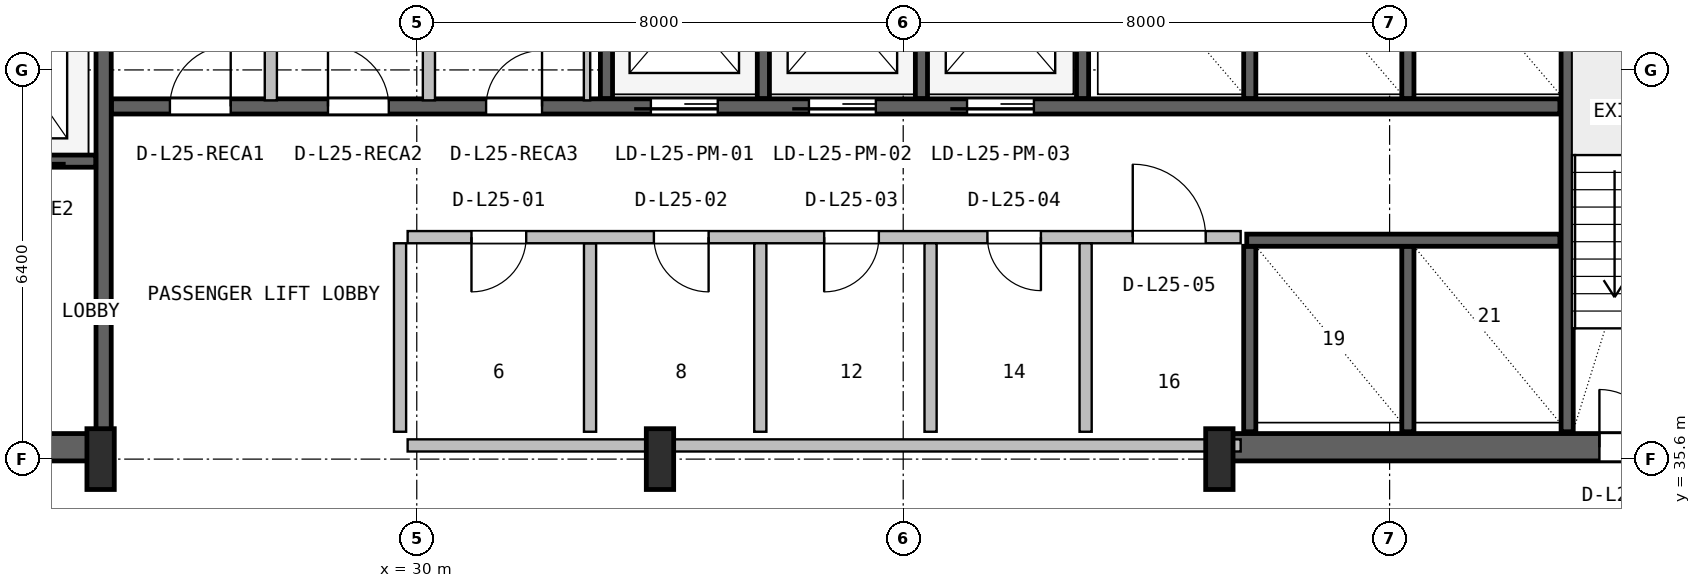
"""IFC4 building model, lengths in metres.
Left out: names, types, materials, properties, quantities, classifications, styles, units other than length and angle.
Written with IfcOpenShell. Run it as: python <this file> out.ifc"""

import sys

from ifc_helpers import new_model, si_unit, direction, frame, frame_2d, origin, origin_2d, place, context, subcontext, project, spatial, rectangle, i_section, extrude, source, transform, mapped, element, fill, save


model = new_model("IFC4")
c1 = context("Model", 3, precision=1e-05, world=origin(), true_north=direction((0.0, 1.0)))
c2 = subcontext(c1, "Body", "Model", "MODEL_VIEW")
j1 = project(units=[si_unit("LENGTHUNIT", "METRE"), si_unit("PLANEANGLEUNIT", "RADIAN")], contexts=[c1])
p1 = place(None, origin())
s1 = spatial("IfcSite", under=j1, at=p1, CompositionType="ELEMENT")
p2 = place(p1, origin())
s2 = spatial("IfcBuilding", under=s1, at=p2, CompositionType="ELEMENT")
p3 = place(p2, frame((0.0, 0.0, 106.8)))
s3 = spatial("IfcBuildingStorey", under=s2, at=p3, CompositionType="ELEMENT", Elevation=106.8)
p4 = place(p3, frame((15.57, 35.795, 0.0), z_axis=(0.0, 0.0, 1.0), x_axis=(1.0, 0.0, 0.0)))
e1 = element("IfcWall", 1, at=p4, inside=s3, PredefinedType="SHEAR", context=c2, shape_type="SweptSolid", body=[
    extrude(rectangle(XDim=9.23, YDim=0.45, at=frame_2d((4.615, 0.0))), origin(), (0.0, 0.0, 1.0), 3.55),
])
p5 = place(p4, frame((5.4, 0.0, 0.0)))
e2 = element("IfcOpeningElement", 2, at=p5, cuts=e1, PredefinedType="OPENING", context=c2, shape_type="SweptSolid", body=[
    extrude(rectangle(XDim=1.0, YDim=2.1, at=frame_2d((0.5, 1.05))), frame((0.0, 0.235, 0.0), z_axis=(0.0, -1.0, 0.0), x_axis=(1.0, 0.0, 0.0)), (0.0, 0.0, 1.0), 0.47),
])
p6 = place(p3, frame((43.2, 35.795, 0.0), z_axis=(0.0, 0.0, 1.0), x_axis=(1.0, 0.0, 0.0)))
e3 = element("IfcWall", 3, at=p6, inside=s3, PredefinedType="SHEAR", context=c2, shape_type="SweptSolid", body=[
    extrude(rectangle(XDim=9.23, YDim=0.45, at=frame_2d((4.615, 0.0))), origin(), (0.0, 0.0, 1.0), 3.55),
])
p7 = place(p6, frame((6.25, 0.0, 0.0)))
e4 = element("IfcOpeningElement", 4, at=p7, cuts=e3, PredefinedType="OPENING", context=c2, shape_type="SweptSolid", body=[
    extrude(rectangle(XDim=0.95, YDim=2.1, at=frame_2d((0.475, 1.05))), frame((0.0, 0.235, 0.0), z_axis=(0.0, -1.0, 0.0), x_axis=(1.0, 0.0, 0.0)), (0.0, 0.0, 1.0), 0.47),
])
m1 = source(origin(), c2, "Body", "SweptSolid", [
    extrude(i_section(OverallWidth=0.45, OverallDepth=1.0, WebThickness=0.016, FlangeThickness=0.03, FilletRadius=0.016, at=origin_2d()), origin(), (0.0, 0.0, 1.0), 3.8),
])
for number, where, z_axis, x_axis in (
    (5, (24.8, 35.6, 0.0), (0.0, 0.0, 1.0), (1.0, 0.0, 0.0)),
    (6, (34.0, 35.6, 0.0), (0.0, 0.0, 1.0), (1.0, 0.0, 0.0)),
    (7, (43.2, 35.6, 0.0), (0.0, 0.0, 1.0), (1.0, 0.0, 0.0)),
):
    element("IfcColumn", number, at=place(p3, frame(where, z_axis=z_axis, x_axis=x_axis)), inside=s3, PredefinedType="COLUMN", context=c2, shape_type="MappedRepresentation", body=[
        mapped(m1, transform((0.0, 0.0, 0.0), x_axis=(1.0, 0.0, 0.0), y_axis=(0.0, 1.0, 0.0), z_axis=(0.0, 0.0, 1.0), scale=1.0)),
    ])
p8 = place(p3, frame((24.85, 36.05, 0.0), z_axis=(0.0, 0.0, 1.0), x_axis=(0.0, 1.0, 0.0)))
e8 = element("IfcWall", 8, at=p8, inside=s3, PredefinedType="SHEAR", context=c2, shape_type="SweptSolid", body=[
    extrude(rectangle(XDim=10.45, YDim=0.25, at=frame_2d((5.225, 0.0))), origin(), (0.0, 0.0, 1.0), 3.55),
])
p9 = place(p3, frame((19.2, 40.5, 0.0), z_axis=(0.0, 0.0, 1.0), x_axis=(1.0, 0.0, 0.0)))
e9 = element("IfcWall", 9, at=p9, inside=s3, PredefinedType="SHEAR", context=c2, shape_type="SweptSolid", body=[
    extrude(rectangle(XDim=5.52, YDim=0.2, at=frame_2d((2.76, 0.0))), origin(), (0.0, 0.0, 1.0), 3.55),
])
p10 = place(p9, frame((1.05, 0.0, 0.0)))
e10 = element("IfcOpeningElement", 10, at=p10, cuts=e9, PredefinedType="OPENING", context=c2, shape_type="SweptSolid", body=[
    extrude(rectangle(XDim=1.1, YDim=2.18, at=frame_2d((0.55, 1.09))), frame((0.0, 0.11, 0.0), z_axis=(0.0, -1.0, 0.0), x_axis=(1.0, 0.0, 0.0)), (0.0, 0.0, 1.0), 0.22),
])
p11 = place(p9, frame((3.65, 0.0, 0.0)))
e11 = element("IfcOpeningElement", 11, at=p11, cuts=e9, PredefinedType="OPENING", context=c2, shape_type="SweptSolid", body=[
    extrude(rectangle(XDim=1.1, YDim=2.18, at=frame_2d((0.55, 1.09))), frame((0.0, 0.11, 0.0), z_axis=(0.0, -1.0, 0.0), x_axis=(1.0, 0.0, 0.0)), (0.0, 0.0, 1.0), 0.22),
])
p12 = place(p3, frame((48.92, 36.05, 0.0), z_axis=(0.0, 0.0, 1.0), x_axis=(0.0, 1.0, 0.0)))
e12 = element("IfcWall", 12, at=p12, inside=s3, PredefinedType="SHEAR", context=c2, shape_type="SweptSolid", body=[
    extrude(rectangle(XDim=10.5, YDim=0.2, at=frame_2d((5.25, 0.0))), origin(), (0.0, 0.0, 1.0), 3.55),
])
p13 = place(p3, frame((24.98, 41.4, 0.0), z_axis=(0.0, 0.0, 1.0), x_axis=(1.0, 0.0, 0.0)))
e13 = element("IfcWall", 13, at=p13, inside=s3, PredefinedType="SHEAR", context=c2, shape_type="SweptSolid", body=[
    extrude(rectangle(XDim=23.82, YDim=0.25, at=frame_2d((11.91, 0.0))), origin(), (0.0, 0.0, 1.0), 3.55),
])
p14 = place(p13, frame((8.87, 0.0, 0.0)))
e14 = element("IfcOpeningElement", 14, at=p14, cuts=e13, PredefinedType="OPENING", context=c2, shape_type="SweptSolid", body=[
    extrude(rectangle(XDim=1.1, YDim=2.18, at=frame_2d((0.55, 1.09))), frame((0.0, 0.135, 0.0), z_axis=(0.0, -1.0, 0.0), x_axis=(1.0, 0.0, 0.0)), (0.0, 0.0, 1.0), 0.27),
])
p15 = place(p13, frame((11.47, 0.0, 0.0)))
e15 = element("IfcOpeningElement", 15, at=p15, cuts=e13, PredefinedType="OPENING", context=c2, shape_type="SweptSolid", body=[
    extrude(rectangle(XDim=1.1, YDim=2.18, at=frame_2d((0.55, 1.09))), frame((0.0, 0.135, 0.0), z_axis=(0.0, -1.0, 0.0), x_axis=(1.0, 0.0, 0.0)), (0.0, 0.0, 1.0), 0.27),
])
p16 = place(p13, frame((14.07, 0.0, 0.0)))
e16 = element("IfcOpeningElement", 16, at=p16, cuts=e13, PredefinedType="OPENING", context=c2, shape_type="SweptSolid", body=[
    extrude(rectangle(XDim=1.1, YDim=2.18, at=frame_2d((0.55, 1.09))), frame((0.0, 0.135, 0.0), z_axis=(0.0, -1.0, 0.0), x_axis=(1.0, 0.0, 0.0)), (0.0, 0.0, 1.0), 0.27),
])
p17 = place(p13, frame((0.96, 0.0, 0.0)))
e17 = element("IfcOpeningElement", 17, at=p17, cuts=e13, PredefinedType="OPENING", context=c2, shape_type="SweptSolid", body=[
    extrude(rectangle(XDim=1.0, YDim=2.08, at=frame_2d((0.5, 1.04))), frame((0.0, 0.135, 0.0), z_axis=(0.0, -1.0, 0.0), x_axis=(1.0, 0.0, 0.0)), (0.0, 0.0, 1.0), 0.27),
])
p18 = place(p13, frame((3.56, 0.0, 0.0)))
e18 = element("IfcOpeningElement", 18, at=p18, cuts=e13, PredefinedType="OPENING", context=c2, shape_type="SweptSolid", body=[
    extrude(rectangle(XDim=1.0, YDim=2.08, at=frame_2d((0.5, 1.04))), frame((0.0, 0.135, 0.0), z_axis=(0.0, -1.0, 0.0), x_axis=(1.0, 0.0, 0.0)), (0.0, 0.0, 1.0), 0.27),
])
p19 = place(p13, frame((6.16, 0.0, 0.0)))
e19 = element("IfcOpeningElement", 19, at=p19, cuts=e13, PredefinedType="OPENING", context=c2, shape_type="SweptSolid", body=[
    extrude(rectangle(XDim=0.92, YDim=2.08, at=frame_2d((0.46, 1.04))), frame((0.0, 0.135, 0.0), z_axis=(0.0, -1.0, 0.0), x_axis=(1.0, 0.0, 0.0)), (0.0, 0.0, 1.0), 0.27),
])
p20 = place(p3, frame((33.12, 41.53, 0.0), z_axis=(0.0, 0.0, 1.0), x_axis=(0.0, 1.0, 0.0)))
e20 = element("IfcWall", 20, at=p20, inside=s3, PredefinedType="SHEAR", context=c2, shape_type="SweptSolid", body=[
    extrude(rectangle(XDim=5.02, YDim=0.2, at=frame_2d((2.51, 0.0))), origin(), (0.0, 0.0, 1.0), 3.55),
])
for number, where, z_axis, x_axis in (
    (21, (35.7, 41.53, 0.0), (0.0, 0.0, 1.0), (0.0, 1.0, 0.0)),
    (22, (38.3, 41.53, 0.0), (0.0, 0.0, 1.0), (0.0, 1.0, 0.0)),
):
    element("IfcWall", number, at=place(p3, frame(where, z_axis=z_axis, x_axis=x_axis)), inside=s3, PredefinedType="SHEAR", context=c2, shape_type="SweptSolid", body=[
        extrude(rectangle(XDim=2.87, YDim=0.2, at=frame_2d((1.435, 0.0))), origin(), (0.0, 0.0, 1.0), 3.55),
    ])
p21 = place(p3, frame((40.95, 41.53, 0.0), z_axis=(0.0, 0.0, 1.0), x_axis=(0.0, 1.0, 0.0)))
e23 = element("IfcWall", 23, at=p21, inside=s3, PredefinedType="SHEAR", context=c2, shape_type="SweptSolid", body=[
    extrude(rectangle(XDim=5.02, YDim=0.2, at=frame_2d((2.51, 0.0))), origin(), (0.0, 0.0, 1.0), 3.55),
])
for number, where, z_axis, x_axis in (
    (24, (43.7, 41.53, 0.0), (0.0, 0.0, 1.0), (0.0, 1.0, 0.0)),
    (25, (46.3, 41.53, 0.0), (0.0, 0.0, 1.0), (0.0, 1.0, 0.0)),
):
    element("IfcWall", number, at=place(p3, frame(where, z_axis=z_axis, x_axis=x_axis)), inside=s3, PredefinedType="SHEAR", context=c2, shape_type="SweptSolid", body=[
        extrude(rectangle(XDim=2.87, YDim=0.2, at=frame_2d((1.435, 0.0))), origin(), (0.0, 0.0, 1.0), 3.55),
    ])
for number, where, z_axis, x_axis in (
    (26, (43.7, 36.05, 0.0), (0.0, 0.0, 1.0), (0.0, 1.0, 0.0)),
    (27, (46.3, 36.05, 0.0), (0.0, 0.0, 1.0), (0.0, 1.0, 0.0)),
):
    element("IfcWall", number, at=place(p3, frame(where, z_axis=z_axis, x_axis=x_axis)), inside=s3, PredefinedType="SHEAR", context=c2, shape_type="SweptSolid", body=[
        extrude(rectangle(XDim=3.05, YDim=0.2, at=frame_2d((1.525, 0.0))), origin(), (0.0, 0.0, 1.0), 3.55),
    ])
p22 = place(p3, frame((43.65, 39.2, 0.0), z_axis=(0.0, 0.0, 1.0), x_axis=(1.0, 0.0, 0.0)))
e28 = element("IfcWall", 28, at=p22, inside=s3, PredefinedType="SHEAR", context=c2, shape_type="SweptSolid", body=[
    extrude(rectangle(XDim=5.15, YDim=0.2, at=frame_2d((2.575, 0.0))), origin(), (0.0, 0.0, 1.0), 3.55),
])
p23 = place(p3, frame((29.85, 35.825, 0.0), z_axis=(0.0, 0.0, 1.0), x_axis=(1.0, 0.0, 0.0)))
e29 = element("IfcWall", 29, at=p23, inside=s3, PredefinedType="SOLIDWALL", context=c2, shape_type="SweptSolid", body=[
    extrude(rectangle(XDim=13.7, YDim=0.2, at=frame_2d((6.85, 0.0))), origin(), (0.0, 0.0, 1.0), 2.325),
])
p24 = place(p3, frame((32.85, 36.05, 0.0), z_axis=(0.0, 0.0, 1.0), x_axis=(0.0, 1.0, 0.0)))
e30 = element("IfcWall", 30, at=p24, inside=s3, PredefinedType="PLUMBINGWALL", context=c2, shape_type="SweptSolid", body=[
    extrude(rectangle(XDim=3.1, YDim=0.2, at=frame_2d((1.55, 0.0))), origin(), (0.0, 0.0, 1.0), 3.53),
])
p25 = place(p3, frame((29.85, 39.25, 0.0), z_axis=(0.0, 0.0, 1.0), x_axis=(1.0, 0.0, 0.0)))
e31 = element("IfcWall", 31, at=p25, inside=s3, PredefinedType="SOLIDWALL", context=c2, shape_type="SweptSolid", body=[
    extrude(rectangle(XDim=13.7, YDim=0.2, at=frame_2d((6.85, 0.0))), origin(), (0.0, 0.0, 1.0), 3.53),
])
p26 = place(p25, frame((1.05, 0.0, 0.0)))
e32 = element("IfcOpeningElement", 32, at=p26, cuts=e31, PredefinedType="OPENING", context=c2, shape_type="SweptSolid", body=[
    extrude(rectangle(XDim=0.9, YDim=2.06, at=frame_2d((0.45, 1.03))), frame((0.0, 0.11, 0.0), z_axis=(0.0, -1.0, 0.0), x_axis=(1.0, 0.0, 0.0)), (0.0, 0.0, 1.0), 0.22),
])
p27 = place(p25, frame((4.05, 0.0, 0.0)))
e33 = element("IfcOpeningElement", 33, at=p27, cuts=e31, PredefinedType="OPENING", context=c2, shape_type="SweptSolid", body=[
    extrude(rectangle(XDim=0.9, YDim=2.06, at=frame_2d((0.45, 1.03))), frame((0.0, 0.11, 0.0), z_axis=(0.0, -1.0, 0.0), x_axis=(1.0, 0.0, 0.0)), (0.0, 0.0, 1.0), 0.22),
])
p28 = place(p25, frame((6.85, 0.0, 0.0)))
e34 = element("IfcOpeningElement", 34, at=p28, cuts=e31, PredefinedType="OPENING", context=c2, shape_type="SweptSolid", body=[
    extrude(rectangle(XDim=0.9, YDim=2.06, at=frame_2d((0.45, 1.03))), frame((0.0, 0.11, 0.0), z_axis=(0.0, -1.0, 0.0), x_axis=(1.0, 0.0, 0.0)), (0.0, 0.0, 1.0), 0.22),
])
p29 = place(p25, frame((9.535, 0.0, 0.0)))
e35 = element("IfcOpeningElement", 35, at=p29, cuts=e31, PredefinedType="OPENING", context=c2, shape_type="SweptSolid", body=[
    extrude(rectangle(XDim=0.88, YDim=2.06, at=frame_2d((0.44, 1.03))), frame((0.0, 0.11, 0.0), z_axis=(0.0, -1.0, 0.0), x_axis=(1.0, 0.0, 0.0)), (0.0, 0.0, 1.0), 0.22),
])
p30 = place(p25, frame((11.925, 0.0, 0.0)))
e36 = element("IfcOpeningElement", 36, at=p30, cuts=e31, PredefinedType="OPENING", context=c2, shape_type="SweptSolid", body=[
    extrude(rectangle(XDim=1.2, YDim=2.1, at=frame_2d((0.6, 1.05))), frame((0.0, 0.11, 0.0), z_axis=(0.0, -1.0, 0.0), x_axis=(1.0, 0.0, 0.0)), (0.0, 0.0, 1.0), 0.22),
])
for number, where, z_axis, x_axis in (
    (37, (29.725, 36.05, 0.0), (0.0, 0.0, 1.0), (0.0, 1.0, 0.0)),
    (38, (35.65, 36.05, 0.0), (0.0, 0.0, 1.0), (0.0, 1.0, 0.0)),
    (39, (38.45, 36.05, 0.0), (0.0, 0.0, 1.0), (0.0, 1.0, 0.0)),
):
    element("IfcWall", number, at=place(p3, frame(where, z_axis=z_axis, x_axis=x_axis)), inside=s3, PredefinedType="PLUMBINGWALL", context=c2, shape_type="SweptSolid", body=[
        extrude(rectangle(XDim=3.1, YDim=0.2, at=frame_2d((1.55, 0.0))), origin(), (0.0, 0.0, 1.0), 3.53),
    ])
p31 = place(p3, frame((41.0, 36.05, 0.0), z_axis=(0.0, 0.0, 1.0), x_axis=(0.0, 1.0, 0.0)))
e40 = element("IfcWall", 40, at=p31, inside=s3, PredefinedType="SOLIDWALL", context=c2, shape_type="SweptSolid", body=[
    extrude(rectangle(XDim=3.1, YDim=0.2, at=frame_2d((1.55, 0.0))), origin(), (0.0, 0.0, 1.0), 3.53),
])
for number, where, z_axis, x_axis in (
    (41, (27.6, 41.5, 0.0), (0.0, 0.0, 1.0), (0.0, 1.0, 0.0)),
    (42, (30.2, 41.5, 0.0), (0.0, 0.0, 1.0), (0.0, 1.0, 0.0)),
):
    element("IfcWall", number, at=place(p3, frame(where, z_axis=z_axis, x_axis=x_axis)), inside=s3, PredefinedType="SOLIDWALL", context=c2, shape_type="SweptSolid", body=[
        extrude(rectangle(XDim=5.02, YDim=0.2, at=frame_2d((2.51, 0.0))), origin(), (0.0, 0.0, 1.0), 3.53),
    ])
p32 = place(p3, frame((32.8, 41.5, 0.0), z_axis=(0.0, 0.0, 1.0), x_axis=(0.0, 1.0, 0.0)))
e43 = element("IfcWall", 43, at=p32, inside=s3, PredefinedType="PARTITIONING", context=c2, shape_type="SweptSolid", body=[
    extrude(rectangle(XDim=5.02, YDim=0.105, at=frame_2d((2.51, 0.0))), origin(), (0.0, 0.0, 1.0), 3.53),
])
m2 = source(origin(), c2, "Body", "SweptSolid", [
    extrude(rectangle(XDim=0.95, YDim=2.1, at=frame_2d((0.475, 1.05))), frame((0.0, 0.025, 0.0), z_axis=(0.0, -1.0, 0.0), x_axis=(1.0, 0.0, 0.0)), (0.0, 0.0, 1.0), 0.05),
])
p33 = place(p7, origin())
e44 = element("IfcDoor", 44, at=p33, inside=s3, OperationType="SINGLE_SWING_LEFT", PredefinedType="DOOR", context=c2, shape_type="MappedRepresentation", body=[
    mapped(m2, transform((0.0, 0.0, 0.0), x_axis=(1.0, 0.0, 0.0), y_axis=(0.0, 1.0, 0.0), z_axis=(0.0, 0.0, 1.0), scale=1.0)),
])
fill(e4, e44)
m3 = source(origin(), c2, "Body", "SweptSolid", [
    extrude(rectangle(XDim=1.1, YDim=2.18, at=frame_2d((0.55, 1.09))), frame((0.0, 0.025, 0.0), z_axis=(0.0, -1.0, 0.0), x_axis=(1.0, 0.0, 0.0)), (0.0, 0.0, 1.0), 0.05),
])
p34 = place(p14, frame((1.1, 0.0, 0.0), z_axis=(0.0, 0.0, 1.0), x_axis=(-1.0, 0.0, 0.0)))
e45 = element("IfcDoor", 45, at=p34, inside=s3, OperationType="SLIDING_TO_LEFT", PredefinedType="DOOR", context=c2, shape_type="MappedRepresentation", body=[
    mapped(m3, transform((0.0, 0.0, 0.0), x_axis=(1.0, 0.0, 0.0), y_axis=(0.0, 1.0, 0.0), z_axis=(0.0, 0.0, 1.0), scale=1.0)),
])
fill(e14, e45)
p35 = place(p15, frame((1.1, 0.0, 0.0), z_axis=(0.0, 0.0, 1.0), x_axis=(-1.0, 0.0, 0.0)))
e46 = element("IfcDoor", 46, at=p35, inside=s3, OperationType="SLIDING_TO_LEFT", PredefinedType="DOOR", context=c2, shape_type="MappedRepresentation", body=[
    mapped(m3, transform((0.0, 0.0, 0.0), x_axis=(1.0, 0.0, 0.0), y_axis=(0.0, 1.0, 0.0), z_axis=(0.0, 0.0, 1.0), scale=1.0)),
])
fill(e15, e46)
p36 = place(p16, frame((1.1, 0.0, 0.0), z_axis=(0.0, 0.0, 1.0), x_axis=(-1.0, 0.0, 0.0)))
e47 = element("IfcDoor", 47, at=p36, inside=s3, OperationType="SLIDING_TO_LEFT", PredefinedType="DOOR", context=c2, shape_type="MappedRepresentation", body=[
    mapped(m3, transform((0.0, 0.0, 0.0), x_axis=(1.0, 0.0, 0.0), y_axis=(0.0, 1.0, 0.0), z_axis=(0.0, 0.0, 1.0), scale=1.0)),
])
fill(e16, e47)
m4 = source(origin(), c2, "Body", "SweptSolid", [
    extrude(rectangle(XDim=1.0, YDim=2.08, at=frame_2d((0.5, 1.04))), frame((0.0, 0.025, 0.0), z_axis=(0.0, -1.0, 0.0), x_axis=(1.0, 0.0, 0.0)), (0.0, 0.0, 1.0), 0.05),
])
p37 = place(p17, origin())
e48 = element("IfcDoor", 48, at=p37, inside=s3, OperationType="SINGLE_SWING_RIGHT", PredefinedType="DOOR", context=c2, shape_type="MappedRepresentation", body=[
    mapped(m4, transform((0.0, 0.0, 0.0), x_axis=(1.0, 0.0, 0.0), y_axis=(0.0, 1.0, 0.0), z_axis=(0.0, 0.0, 1.0), scale=1.0)),
])
fill(e17, e48)
p38 = place(p18, origin())
e49 = element("IfcDoor", 49, at=p38, inside=s3, OperationType="SINGLE_SWING_LEFT", PredefinedType="DOOR", context=c2, shape_type="MappedRepresentation", body=[
    mapped(m4, transform((0.0, 0.0, 0.0), x_axis=(1.0, 0.0, 0.0), y_axis=(0.0, 1.0, 0.0), z_axis=(0.0, 0.0, 1.0), scale=1.0)),
])
fill(e18, e49)
m5 = source(origin(), c2, "Body", "SweptSolid", [
    extrude(rectangle(XDim=0.92, YDim=2.08, at=frame_2d((0.46, 1.04))), frame((0.0, 0.025, 0.0), z_axis=(0.0, -1.0, 0.0), x_axis=(1.0, 0.0, 0.0)), (0.0, 0.0, 1.0), 0.05),
])
p39 = place(p19, origin())
e50 = element("IfcDoor", 50, at=p39, inside=s3, OperationType="SINGLE_SWING_RIGHT", PredefinedType="DOOR", context=c2, shape_type="MappedRepresentation", body=[
    mapped(m5, transform((0.0, 0.0, 0.0), x_axis=(1.0, 0.0, 0.0), y_axis=(0.0, 1.0, 0.0), z_axis=(0.0, 0.0, 1.0), scale=1.0)),
])
fill(e19, e50)
m6 = source(origin(), c2, "Body", "SweptSolid", [
    extrude(rectangle(XDim=0.9, YDim=2.06, at=frame_2d((0.45, 1.03))), frame((0.0, 0.025, 0.0), z_axis=(0.0, -1.0, 0.0), x_axis=(1.0, 0.0, 0.0)), (0.0, 0.0, 1.0), 0.05),
])
p40 = place(p26, frame((0.9, 0.0, 0.0), z_axis=(0.0, 0.0, 1.0), x_axis=(-1.0, 0.0, 0.0)))
e51 = element("IfcDoor", 51, at=p40, inside=s3, OperationType="SINGLE_SWING_LEFT", PredefinedType="DOOR", context=c2, shape_type="MappedRepresentation", body=[
    mapped(m6, transform((0.0, 0.0, 0.0), x_axis=(1.0, 0.0, 0.0), y_axis=(0.0, 1.0, 0.0), z_axis=(0.0, 0.0, 1.0), scale=1.0)),
])
fill(e32, e51)
p41 = place(p27, frame((0.9, 0.0, 0.0), z_axis=(0.0, 0.0, 1.0), x_axis=(-1.0, 0.0, 0.0)))
e52 = element("IfcDoor", 52, at=p41, inside=s3, OperationType="SINGLE_SWING_RIGHT", PredefinedType="DOOR", context=c2, shape_type="MappedRepresentation", body=[
    mapped(m6, transform((0.0, 0.0, 0.0), x_axis=(1.0, 0.0, 0.0), y_axis=(0.0, 1.0, 0.0), z_axis=(0.0, 0.0, 1.0), scale=1.0)),
])
fill(e33, e52)
p42 = place(p28, frame((0.9, 0.0, 0.0), z_axis=(0.0, 0.0, 1.0), x_axis=(-1.0, 0.0, 0.0)))
e53 = element("IfcDoor", 53, at=p42, inside=s3, OperationType="SINGLE_SWING_LEFT", PredefinedType="DOOR", context=c2, shape_type="MappedRepresentation", body=[
    mapped(m6, transform((0.0, 0.0, 0.0), x_axis=(1.0, 0.0, 0.0), y_axis=(0.0, 1.0, 0.0), z_axis=(0.0, 0.0, 1.0), scale=1.0)),
])
fill(e34, e53)
m7 = source(origin(), c2, "Body", "SweptSolid", [
    extrude(rectangle(XDim=0.88, YDim=2.06, at=frame_2d((0.44, 1.03))), frame((0.0, 0.025, 0.0), z_axis=(0.0, -1.0, 0.0), x_axis=(1.0, 0.0, 0.0)), (0.0, 0.0, 1.0), 0.05),
])
p43 = place(p29, frame((0.88, 0.0, 0.0), z_axis=(0.0, 0.0, 1.0), x_axis=(-1.0, 0.0, 0.0)))
e54 = element("IfcDoor", 54, at=p43, inside=s3, OperationType="SINGLE_SWING_RIGHT", PredefinedType="DOOR", context=c2, shape_type="MappedRepresentation", body=[
    mapped(m7, transform((0.0, 0.0, 0.0), x_axis=(1.0, 0.0, 0.0), y_axis=(0.0, 1.0, 0.0), z_axis=(0.0, 0.0, 1.0), scale=1.0)),
])
fill(e35, e54)
m8 = source(origin(), c2, "Body", "SweptSolid", [
    extrude(rectangle(XDim=1.2, YDim=2.1, at=frame_2d((0.6, 1.05))), frame((0.0, 0.025, 0.0), z_axis=(0.0, -1.0, 0.0), x_axis=(1.0, 0.0, 0.0)), (0.0, 0.0, 1.0), 0.05),
])
p44 = place(p30, origin())
e55 = element("IfcDoor", 55, at=p44, inside=s3, OperationType="SINGLE_SWING_LEFT", PredefinedType="DOOR", context=c2, shape_type="MappedRepresentation", body=[
    mapped(m8, transform((0.0, 0.0, 0.0), x_axis=(1.0, 0.0, 0.0), y_axis=(0.0, 1.0, 0.0), z_axis=(0.0, 0.0, 1.0), scale=1.0)),
])
fill(e36, e55)
save(model, sys.argv[1])
